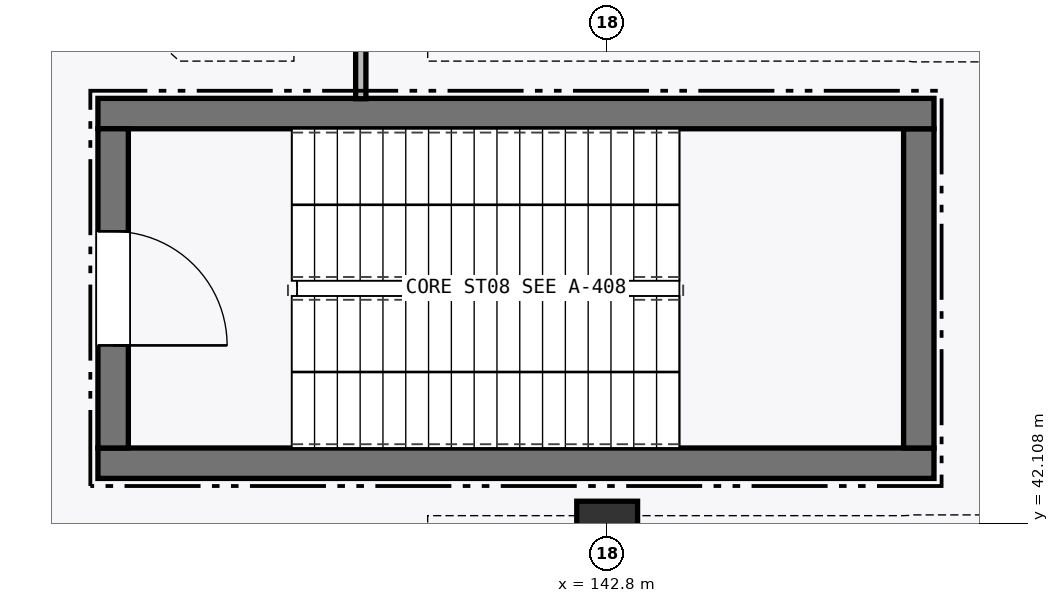
"""IFC4 building model, lengths in metres.
Left out: names, types, materials, properties, quantities, classifications, styles, units other than length and angle.
Written with IfcOpenShell. Run it as: python <this file> out.ifc"""

import sys

from ifc_helpers import new_model, si_unit, direction, frame, frame_2d, origin, origin_2d, place, context, subcontext, project, spatial, rectangle, extrude, element, fill, save


model = new_model("IFC4")
c1 = context("Model", 3, precision=1e-05, world=origin(), true_north=direction((0.0, 1.0)))
c2 = subcontext(c1, "Body", "Model", "MODEL_VIEW")
j1 = project(units=[si_unit("LENGTHUNIT", "METRE"), si_unit("PLANEANGLEUNIT", "RADIAN")], contexts=[c1])
p1 = place(None, origin())
s1 = spatial("IfcSite", under=j1, at=p1, CompositionType="ELEMENT")
p2 = place(p1, origin())
s2 = spatial("IfcBuilding", under=s1, at=p2, CompositionType="ELEMENT")
p3 = place(p2, frame((0.0, 0.0, 6.0)))
s3 = spatial("IfcBuildingStorey", under=s2, at=p3, CompositionType="ELEMENT", Elevation=6.0)
p4 = place(p3, frame((142.8, 42.0, 0.0), z_axis=(0.0, 0.0, 1.0), x_axis=(1.0, 0.0, 0.0)))
e1 = element("IfcColumn", 1, at=p4, inside=s3, PredefinedType="COLUMN", context=c2, shape_type="SweptSolid", body=[
    extrude(rectangle(XDim=0.8, YDim=0.8, at=origin_2d()), origin(), (0.0, 0.0, 1.0), 5.4),
])
p5 = place(p3, frame((136.1, 42.9, 0.0), z_axis=(0.0, 0.0, 1.0), x_axis=(1.0, 0.0, 0.0)))
e2 = element("IfcWall", 2, at=p5, inside=s3, PredefinedType="SHEAR", context=c2, shape_type="SweptSolid", body=[
    extrude(rectangle(XDim=11.0, YDim=0.4, at=frame_2d((5.5, 0.0))), origin(), (0.0, 0.0, 1.0), 5.145),
])
p6 = place(p3, frame((146.9, 43.1, 0.0), z_axis=(0.0, 0.0, 1.0), x_axis=(0.0, 1.0, 0.0)))
e3 = element("IfcWall", 3, at=p6, inside=s3, PredefinedType="SHEAR", context=c2, shape_type="SweptSolid", body=[
    extrude(rectangle(XDim=4.2, YDim=0.4, at=frame_2d((2.1, 0.0))), origin(), (0.0, 0.0, 1.0), 5.145),
])
p7 = place(p3, frame((147.1, 47.5, 0.0), z_axis=(0.0, 0.0, 1.0), x_axis=(-1.0, 0.0, 0.0)))
e4 = element("IfcWall", 4, at=p7, inside=s3, PredefinedType="SHEAR", context=c2, shape_type="SweptSolid", body=[
    extrude(rectangle(XDim=11.0, YDim=0.4, at=frame_2d((5.5, 0.0))), origin(), (0.0, 0.0, 1.0), 5.145),
])
p8 = place(p3, frame((136.3, 47.3, 0.0), z_axis=(0.0, 0.0, 1.0), x_axis=(0.0, -1.0, 0.0)))
e5 = element("IfcWall", 5, at=p8, inside=s3, PredefinedType="SHEAR", context=c2, shape_type="SweptSolid", body=[
    extrude(rectangle(XDim=4.2, YDim=0.4, at=frame_2d((2.1, 0.0))), origin(), (0.0, 0.0, 1.0), 5.145),
])
p9 = place(p8, frame((1.35, 0.0, 0.0)))
e6 = element("IfcOpeningElement", 6, at=p9, cuts=e5, PredefinedType="OPENING", context=c2, shape_type="SweptSolid", body=[
    extrude(rectangle(XDim=1.5, YDim=2.15, at=frame_2d((0.75, 1.075))), frame((0.0, 0.21, 0.0), z_axis=(0.0, -1.0, 0.0), x_axis=(1.0, 0.0, 0.0)), (0.0, 0.0, 1.0), 0.42),
])
p10 = place(p3, frame((139.558, 47.695, 0.0), z_axis=(0.0, 0.0, 1.0), x_axis=(0.0, 1.0, 0.0)))
e7 = element("IfcWall", 7, at=p10, inside=s3, PredefinedType="PARTITIONING", context=c2, shape_type="SweptSolid", body=[
    extrude(rectangle(XDim=2.41, YDim=0.135, at=frame_2d((1.205, 0.0))), origin(), (0.0, 0.0, 1.0), 5.145),
])
p11 = place(p9, origin())
e8 = element("IfcDoor", 8, at=p11, inside=s3, OperationType="SINGLE_SWING_RIGHT", PredefinedType="DOOR", context=c2, shape_type="SweptSolid", body=[
    extrude(rectangle(XDim=1.5, YDim=2.15, at=frame_2d((0.75, 1.075))), frame((0.0, 0.025, 0.0), z_axis=(0.0, -1.0, 0.0), x_axis=(1.0, 0.0, 0.0)), (0.0, 0.0, 1.0), 0.05),
])
fill(e6, e8)
save(model, sys.argv[1])
